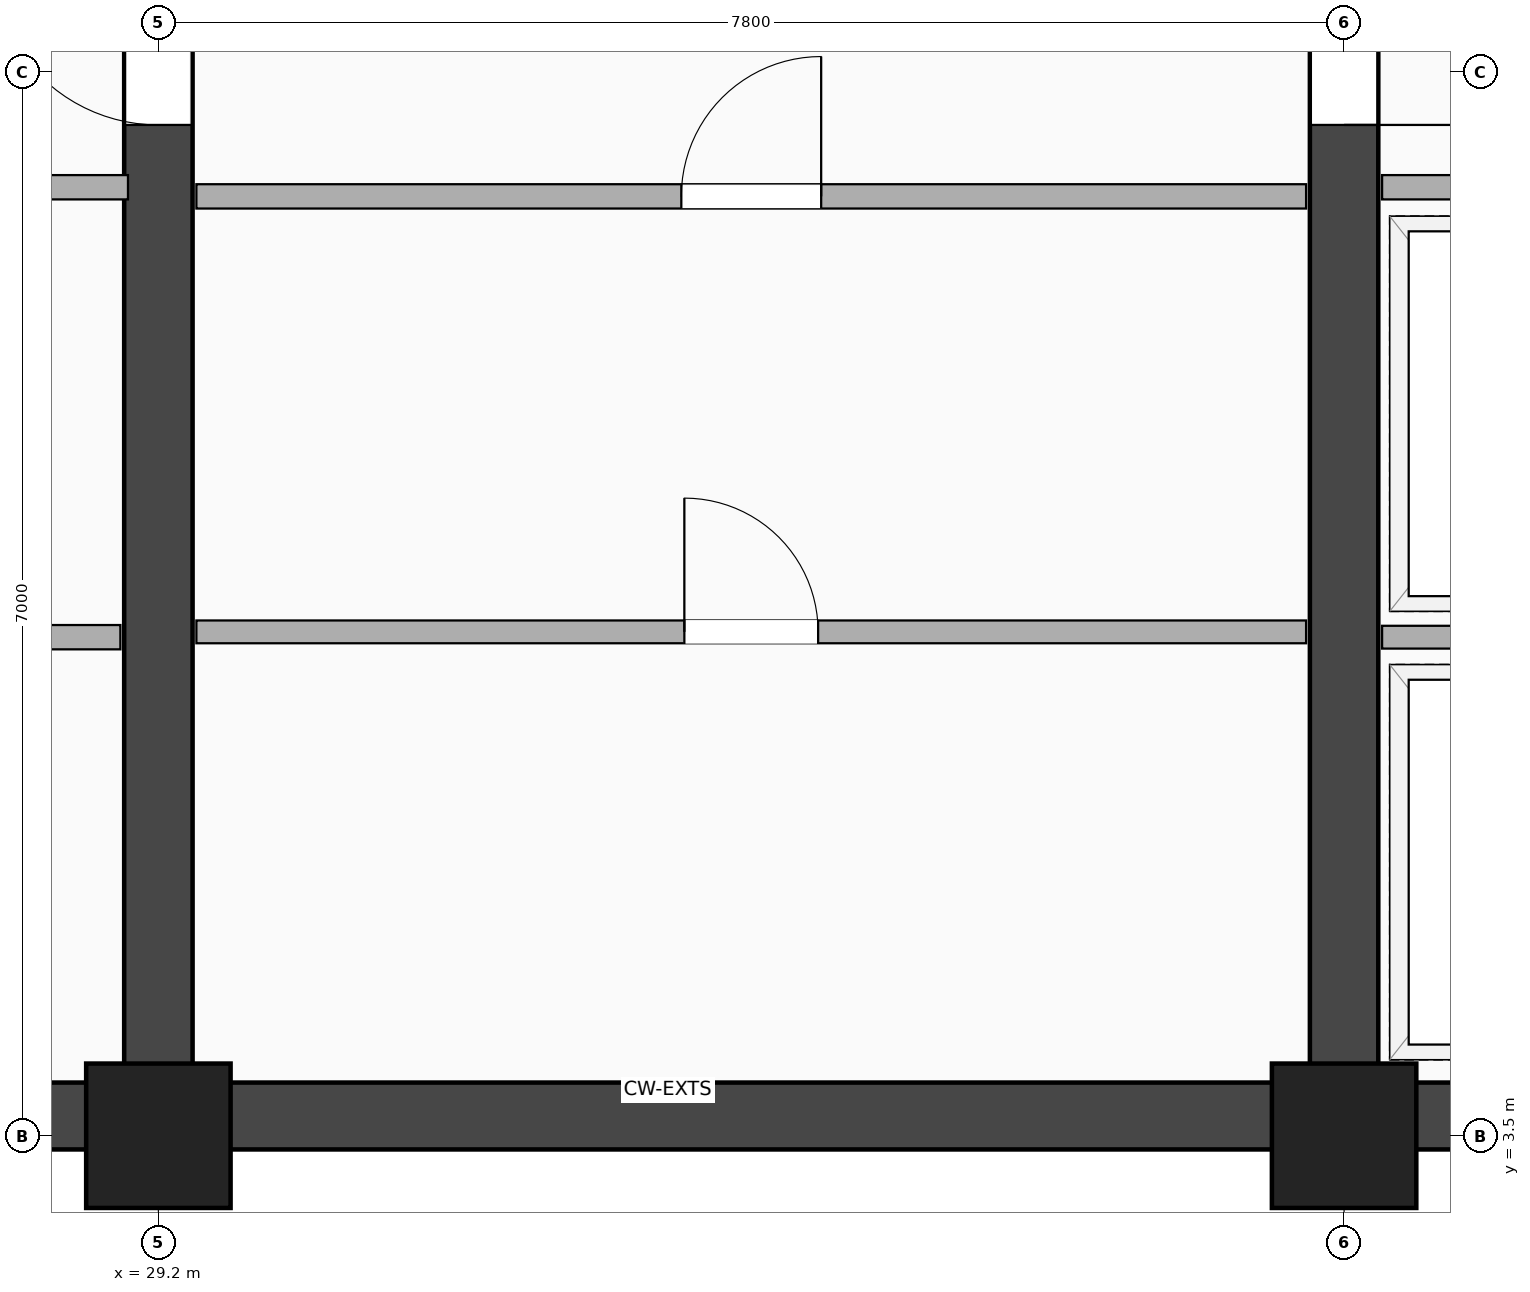
"""IFC4 building model, lengths in metres.
Left out: names, types, materials, properties, quantities, classifications, styles, units other than length and angle.
Written with IfcOpenShell. Run it as: python <this file> out.ifc"""

import sys

from ifc_helpers import new_model, si_unit, direction, frame, frame_2d, origin, origin_2d, place, context, subcontext, project, spatial, rectangle, extrude, element, fill, save


model = new_model("IFC4")
c1 = context("Model", 3, precision=1e-05, world=origin(), true_north=direction((0.0, 1.0)))
c2 = subcontext(c1, "Body", "Model", "MODEL_VIEW")
j1 = project(units=[si_unit("LENGTHUNIT", "METRE"), si_unit("PLANEANGLEUNIT", "RADIAN")], contexts=[c1])
p1 = place(None, origin())
s1 = spatial("IfcSite", under=j1, at=p1, CompositionType="ELEMENT")
p2 = place(p1, origin())
s2 = spatial("IfcBuilding", under=s1, at=p2, CompositionType="ELEMENT")
p3 = place(p2, frame((0.0, 0.0, 192.5)))
s3 = spatial("IfcBuildingStorey", under=s2, at=p3, CompositionType="ELEMENT", Elevation=192.5)
p4 = place(p3, frame((20.3, 3.63, 0.0), z_axis=(0.0, 0.0, 1.0), x_axis=(1.0, 0.0, 0.0)))
e1 = element("IfcWall", 1, at=p4, inside=s3, PredefinedType="SHEAR", context=c2, shape_type="SweptSolid", body=[
    extrude(rectangle(XDim=24.5, YDim=0.44, at=frame_2d((12.25, 0.0))), origin(), (0.0, 0.0, 1.0), 4.16),
])
p5 = place(p3, frame((29.2, 3.5, 0.0), z_axis=(0.0, 0.0, 1.0), x_axis=(0.0, 1.0, 0.0)))
e2 = element("IfcWall", 2, at=p5, inside=s3, PredefinedType="SHEAR", context=c2, shape_type="SweptSolid", body=[
    extrude(rectangle(XDim=14.95, YDim=0.45, at=frame_2d((7.475, 0.0))), origin(), (0.0, 0.0, 1.0), 4.16),
])
p6 = place(p5, frame((7.75, 0.0, 0.0), z_axis=(0.0, 0.0, 1.0), x_axis=(-1.0, 0.0, 0.0)))
e3 = element("IfcOpeningElement", 3, at=p6, cuts=e2, PredefinedType="OPENING", context=c2, shape_type="SweptSolid", body=[
    extrude(rectangle(XDim=1.1, YDim=2.15, at=frame_2d((0.55, 1.075))), frame((0.0, 0.235, 0.0), z_axis=(0.0, -1.0, 0.0), x_axis=(1.0, 0.0, 0.0)), (0.0, 0.0, 1.0), 0.47),
])
p7 = place(p3, frame((37.0, 3.5, 0.0), z_axis=(0.0, 0.0, 1.0), x_axis=(0.0, 1.0, 0.0)))
e4 = element("IfcWall", 4, at=p7, inside=s3, PredefinedType="SHEAR", context=c2, shape_type="SweptSolid", body=[
    extrude(rectangle(XDim=14.95, YDim=0.45, at=frame_2d((7.475, 0.0))), origin(), (0.0, 0.0, 1.0), 4.16),
])
p8 = place(p7, frame((6.65, 0.0, 0.0)))
e5 = element("IfcOpeningElement", 5, at=p8, cuts=e4, PredefinedType="OPENING", context=c2, shape_type="SweptSolid", body=[
    extrude(rectangle(XDim=1.1, YDim=2.15, at=frame_2d((0.55, 1.075))), frame((0.0, 0.235, 0.0), z_axis=(0.0, -1.0, 0.0), x_axis=(1.0, 0.0, 0.0)), (0.0, 0.0, 1.0), 0.47),
])
for number, where, z_axis, x_axis in (
    (6, (29.2, 3.5, -0.24), (0.0, 0.0, 1.0), (1.0, 0.0, 0.0)),
    (7, (37.0, 3.5, -0.24), (0.0, 0.0, 1.0), (1.0, 0.0, 0.0)),
):
    element("IfcColumn", number, at=place(p3, frame(where, z_axis=z_axis, x_axis=x_axis)), inside=s3, PredefinedType="COLUMN", context=c2, shape_type="SweptSolid", body=[
        extrude(rectangle(XDim=0.95, YDim=0.95, at=origin_2d()), origin(), (0.0, 0.0, 1.0), 4.4),
    ])
p9 = place(p3, frame((20.65, 6.78, 0.0), z_axis=(0.0, 0.0, 1.0), x_axis=(1.0, 0.0, 0.0)))
e8 = element("IfcWall", 8, at=p9, inside=s3, PredefinedType="PARTITIONING", context=c2, shape_type="SweptSolid", body=[
    extrude(rectangle(XDim=8.3, YDim=0.16, at=frame_2d((4.15, 0.0))), origin(), (0.0, 0.0, 1.0), 3.372),
])
p10 = place(p9, frame((0.75, 0.0, 0.0)))
e9 = element("IfcOpeningElement", 9, at=p10, cuts=e8, PredefinedType="OPENING", context=c2, shape_type="SweptSolid", body=[
    extrude(rectangle(XDim=1.15, YDim=2.2, at=frame_2d((0.575, 1.1))), frame((0.0, 0.09, 0.0), z_axis=(0.0, -1.0, 0.0), x_axis=(1.0, 0.0, 0.0)), (0.0, 0.0, 1.0), 0.18),
])
p11 = place(p9, frame((3.35, 0.0, 0.0)))
e10 = element("IfcOpeningElement", 10, at=p11, cuts=e8, PredefinedType="OPENING", context=c2, shape_type="SweptSolid", body=[
    extrude(rectangle(XDim=1.15, YDim=2.2, at=frame_2d((0.575, 1.1))), frame((0.0, 0.09, 0.0), z_axis=(0.0, -1.0, 0.0), x_axis=(1.0, 0.0, 0.0)), (0.0, 0.0, 1.0), 0.18),
])
p12 = place(p9, frame((5.95, 0.0, 0.0)))
e11 = element("IfcOpeningElement", 11, at=p12, cuts=e8, PredefinedType="OPENING", context=c2, shape_type="SweptSolid", body=[
    extrude(rectangle(XDim=1.15, YDim=2.2, at=frame_2d((0.575, 1.1))), frame((0.0, 0.09, 0.0), z_axis=(0.0, -1.0, 0.0), x_axis=(1.0, 0.0, 0.0)), (0.0, 0.0, 1.0), 0.18),
])
p13 = place(p3, frame((24.2, 9.74, 0.0), z_axis=(0.0, 0.0, 1.0), x_axis=(1.0, 0.0, 0.0)))
e12 = element("IfcWall", 12, at=p13, inside=s3, PredefinedType="PARTITIONING", context=c2, shape_type="SweptSolid", body=[
    extrude(rectangle(XDim=4.8, YDim=0.16, at=frame_2d((2.4, 0.0))), origin(), (0.0, 0.0, 1.0), 4.16),
])
p14 = place(p13, frame((1.85, 0.0, 0.0)))
e13 = element("IfcOpeningElement", 13, at=p14, cuts=e12, PredefinedType="OPENING", context=c2, shape_type="SweptSolid", body=[
    extrude(rectangle(XDim=1.1, YDim=2.15, at=frame_2d((0.55, 1.075))), frame((0.0, 0.09, 0.0), z_axis=(0.0, -1.0, 0.0), x_axis=(1.0, 0.0, 0.0)), (0.0, 0.0, 1.0), 0.18),
])
p15 = place(p3, frame((37.25, 6.78, 0.0), z_axis=(0.0, 0.0, 1.0), x_axis=(1.0, 0.0, 0.0)))
e14 = element("IfcWall", 14, at=p15, inside=s3, PredefinedType="PARTITIONING", context=c2, shape_type="SweptSolid", body=[
    extrude(rectangle(XDim=2.17, YDim=0.15, at=frame_2d((1.085, 0.0))), origin(), (0.0, 0.0, 1.0), 4.16),
])
p16 = place(p3, frame((37.25, 9.74, 0.0), z_axis=(0.0, 0.0, 1.0), x_axis=(1.0, 0.0, 0.0)))
e15 = element("IfcWall", 15, at=p16, inside=s3, PredefinedType="PARTITIONING", context=c2, shape_type="SweptSolid", body=[
    extrude(rectangle(XDim=2.17, YDim=0.16, at=frame_2d((1.085, 0.0))), origin(), (0.0, 0.0, 1.0), 4.16),
])
p17 = place(p3, frame((29.45, 9.68, 0.0), z_axis=(0.0, 0.0, 1.0), x_axis=(1.0, 0.0, 0.0)))
e16 = element("IfcWall", 16, at=p17, inside=s3, PredefinedType="PARTITIONING", context=c2, shape_type="SweptSolid", body=[
    extrude(rectangle(XDim=7.3, YDim=0.16, at=frame_2d((3.65, 0.0))), origin(), (0.0, 0.0, 1.0), 4.16),
])
p18 = place(p17, frame((4.11, 0.0, 0.0), z_axis=(0.0, 0.0, 1.0), x_axis=(-1.0, 0.0, 0.0)))
e17 = element("IfcOpeningElement", 17, at=p18, cuts=e16, PredefinedType="OPENING", context=c2, shape_type="SweptSolid", body=[
    extrude(rectangle(XDim=0.92, YDim=2.08, at=frame_2d((0.46, 1.04))), frame((0.0, 0.09, 0.0), z_axis=(0.0, -1.0, 0.0), x_axis=(1.0, 0.0, 0.0)), (0.0, 0.0, 1.0), 0.18),
])
p19 = place(p3, frame((29.45, 6.815, 0.0), z_axis=(0.0, 0.0, 1.0), x_axis=(1.0, 0.0, 0.0)))
e18 = element("IfcWall", 18, at=p19, inside=s3, PredefinedType="PARTITIONING", context=c2, shape_type="SweptSolid", body=[
    extrude(rectangle(XDim=7.3, YDim=0.15, at=frame_2d((3.65, 0.0))), origin(), (0.0, 0.0, 1.0), 4.16),
])
p20 = place(p19, frame((4.09, 0.0, 0.0), z_axis=(0.0, 0.0, 1.0), x_axis=(-1.0, 0.0, 0.0)))
e19 = element("IfcOpeningElement", 19, at=p20, cuts=e18, PredefinedType="OPENING", context=c2, shape_type="SweptSolid", body=[
    extrude(rectangle(XDim=0.88, YDim=2.08, at=frame_2d((0.44, 1.04))), frame((0.0, 0.085, 0.0), z_axis=(0.0, -1.0, 0.0), x_axis=(1.0, 0.0, 0.0)), (0.0, 0.0, 1.0), 0.17),
])
p21 = place(p6, origin())
e20 = element("IfcDoor", 20, at=p21, inside=s3, OperationType="SINGLE_SWING_RIGHT", PredefinedType="DOOR", context=c2, shape_type="SweptSolid", body=[
    extrude(rectangle(XDim=1.1, YDim=2.15, at=frame_2d((0.55, 1.075))), frame((0.0, 0.025, 0.0), z_axis=(0.0, -1.0, 0.0), x_axis=(1.0, 0.0, 0.0)), (0.0, 0.0, 1.0), 0.05),
])
fill(e3, e20)
p22 = place(p8, origin())
e21 = element("IfcDoor", 21, at=p22, inside=s3, OperationType="SINGLE_SWING_LEFT", PredefinedType="DOOR", context=c2, shape_type="SweptSolid", body=[
    extrude(rectangle(XDim=1.1, YDim=2.15, at=frame_2d((0.55, 1.075))), frame((0.0, 0.025, 0.0), z_axis=(0.0, -1.0, 0.0), x_axis=(1.0, 0.0, 0.0)), (0.0, 0.0, 1.0), 0.05),
])
fill(e5, e21)
p23 = place(p18, origin())
e22 = element("IfcDoor", 22, at=p23, inside=s3, OperationType="SINGLE_SWING_RIGHT", PredefinedType="DOOR", context=c2, shape_type="SweptSolid", body=[
    extrude(rectangle(XDim=0.92, YDim=2.08, at=frame_2d((0.46, 1.04))), frame((0.0, 0.025, 0.0), z_axis=(0.0, -1.0, 0.0), x_axis=(1.0, 0.0, 0.0)), (0.0, 0.0, 1.0), 0.05),
])
fill(e17, e22)
p24 = place(p20, origin())
e23 = element("IfcDoor", 23, at=p24, inside=s3, OperationType="SINGLE_SWING_LEFT", PredefinedType="DOOR", context=c2, shape_type="SweptSolid", body=[
    extrude(rectangle(XDim=0.88, YDim=2.08, at=frame_2d((0.44, 1.04))), frame((0.0, 0.025, 0.0), z_axis=(0.0, -1.0, 0.0), x_axis=(1.0, 0.0, 0.0)), (0.0, 0.0, 1.0), 0.05),
])
fill(e19, e23)
save(model, sys.argv[1])
